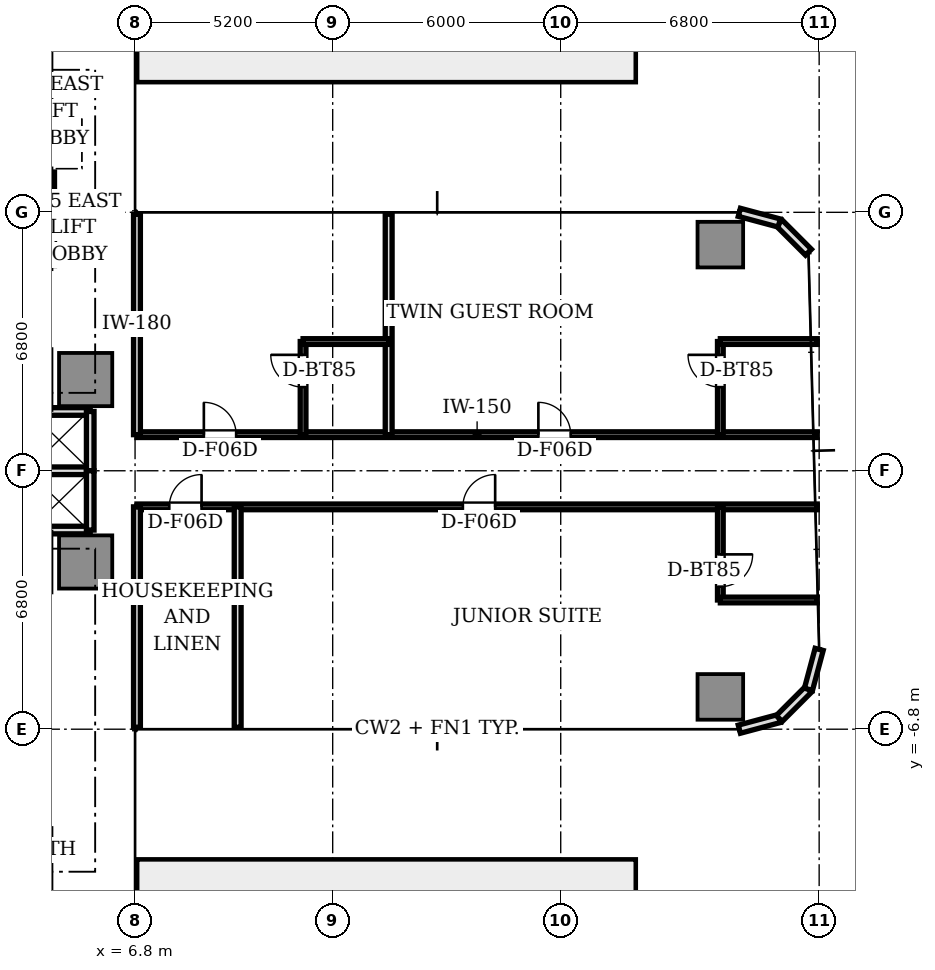
"""IFC4 building model, lengths in metres.
Left out: names, types, materials, properties, quantities, classifications, styles, units other than length and angle.
Written with IfcOpenShell. Run it as: python <this file> out.ifc"""

import sys

from ifc_helpers import new_model, si_unit, direction, frame, frame_2d, origin, origin_2d, place, context, subcontext, project, spatial, rectangle, extrude, source, transform, mapped, element, fill, save


model = new_model("IFC4")
c1 = context("Model", 3, precision=1e-05, world=origin(), true_north=direction((0.0, 1.0)))
c2 = subcontext(c1, "Body", "Model", "MODEL_VIEW")
j1 = project(units=[si_unit("LENGTHUNIT", "METRE"), si_unit("PLANEANGLEUNIT", "RADIAN")], contexts=[c1])
p1 = place(None, origin())
s1 = spatial("IfcSite", under=j1, at=p1, CompositionType="ELEMENT")
p2 = place(p1, origin())
s2 = spatial("IfcBuilding", under=s1, at=p2, CompositionType="ELEMENT")
p3 = place(p2, frame((0.0, 0.0, 23.1)))
s3 = spatial("IfcBuildingStorey", under=s2, at=p3, CompositionType="ELEMENT", Elevation=23.1)
m1 = source(origin(), c2, "Body", "SweptSolid", [
    extrude(rectangle(XDim=1.4, YDim=1.4, at=origin_2d()), origin(), (0.0, 0.0, 1.0), 3.11),
])
for number, where, z_axis, x_axis in (
    (1, (5.5, 2.4, 0.0), (0.0, 0.0, 1.0), (1.0, 0.0, 0.0)),
    (2, (5.5, -2.4, 0.0), (0.0, 0.0, 1.0), (1.0, 0.0, 0.0)),
):
    element("IfcColumn", number, at=place(p3, frame(where, z_axis=z_axis, x_axis=x_axis)), inside=s3, PredefinedType="COLUMN", context=c2, shape_type="MappedRepresentation", body=[
        mapped(m1, transform((0.0, 0.0, 0.0), scale=1.0)),
    ])
m2 = source(origin(), c2, "Body", "SweptSolid", [
    extrude(rectangle(XDim=1.2, YDim=1.2, at=origin_2d()), origin(), (0.0, 0.0, 1.0), 3.11),
])
for number, where, z_axis, x_axis in (
    (3, (22.2, -5.95, 0.0), (0.0, 0.0, 1.0), (1.0, 0.0, 0.0)),
    (4, (22.2, 5.95, 0.0), (0.0, 0.0, 1.0), (1.0, 0.0, 0.0)),
):
    element("IfcColumn", number, at=place(p3, frame(where, z_axis=z_axis, x_axis=x_axis)), inside=s3, PredefinedType="COLUMN", context=c2, shape_type="MappedRepresentation", body=[
        mapped(m2, transform((0.0, 0.0, 0.0), scale=1.0)),
    ])
for number, where, z_axis, x_axis in (
    (5, (22.7, -6.8, 0.0), (0.0, 0.0, 1.0), (0.966, 0.259, 0.0)),
    (6, (23.75, -6.519, 0.0), (0.0, 0.0, 1.0), (0.707, 0.707, 0.0)),
    (7, (24.519, -5.75, 0.0), (0.0, 0.0, 1.0), (0.259, 0.966, 0.0)),
    (8, (24.519, 5.75, 0.0), (0.0, 0.0, 1.0), (-0.707, 0.707, 0.0)),
    (9, (23.75, 6.519, 0.0), (0.0, 0.0, 1.0), (-0.966, 0.259, 0.0)),
):
    element("IfcWall", number, at=place(p3, frame(where, z_axis=z_axis, x_axis=x_axis)), inside=s3, PredefinedType="STANDARD", context=c2, shape_type="SweptSolid", body=[
        extrude(rectangle(XDim=1.087, YDim=0.22, at=frame_2d((0.543, 0.0))), origin(), (0.0, 0.0, 1.0), 3.11),
    ])
for number, where, z_axis, x_axis in (
    (10, (3.98, 1.56, 0.0), (0.0, 0.0, 1.0), (1.0, 0.0, 0.0)),
    (11, (3.98, -1.56, 0.0), (0.0, 0.0, 1.0), (1.0, 0.0, 0.0)),
    (12, (3.98, 0.0, 0.0), (0.0, 0.0, 1.0), (1.0, 0.0, 0.0)),
):
    element("IfcWall", number, at=place(p3, frame(where, z_axis=z_axis, x_axis=x_axis)), inside=s3, PredefinedType="SOLIDWALL", context=c2, shape_type="SweptSolid", body=[
        extrude(rectangle(XDim=1.64, YDim=0.2, at=frame_2d((0.82, 0.0))), origin(), (0.0, 0.0, 1.0), 2.66),
    ])
for number, where, z_axis, x_axis in (
    (13, (5.62, 0.0, 0.0), (0.0, 0.0, 1.0), (0.0, 1.0, 0.0)),
    (14, (5.62, -1.56, 0.0), (0.0, 0.0, 1.0), (0.0, 1.0, 0.0)),
):
    element("IfcWall", number, at=place(p3, frame(where, z_axis=z_axis, x_axis=x_axis)), inside=s3, PredefinedType="SOLIDWALL", context=c2, shape_type="SweptSolid", body=[
        extrude(rectangle(XDim=1.56, YDim=0.2, at=frame_2d((0.78, 0.0))), origin(), (0.0, 0.0, 1.0), 2.66),
    ])
p4 = place(p3, frame((4.58, 5.4, 0.0), z_axis=(0.0, 0.0, 1.0), x_axis=(0.0, 1.0, 0.0)))
e15 = element("IfcWall", 15, at=p4, inside=s3, PredefinedType="SOLIDWALL", context=c2, shape_type="SweptSolid", body=[
    extrude(rectangle(XDim=2.46, YDim=0.2, at=frame_2d((1.23, 0.0))), origin(), (0.0, 0.0, 1.0), 2.66),
])
p5 = place(p4, frame((0.55, 0.0, 0.0)))
e16 = element("IfcOpeningElement", 16, at=p5, cuts=e15, PredefinedType="OPENING", context=c2, shape_type="SweptSolid", body=[
    extrude(rectangle(XDim=0.85, YDim=2.1, at=frame_2d((0.425, 1.05))), frame((0.0, 0.11, 0.0), z_axis=(0.0, -1.0, 0.0), x_axis=(1.0, 0.0, 0.0)), (0.0, 0.0, 1.0), 0.22),
])
p6 = place(p3, frame((6.85, 0.95, 0.0), z_axis=(0.0, 0.0, 1.0), x_axis=(1.0, 0.0, 0.0)))
e17 = element("IfcWall", 17, at=p6, inside=s3, PredefinedType="PARTITIONING", context=c2, shape_type="SweptSolid", body=[
    extrude(rectangle(XDim=17.9, YDim=0.15, at=frame_2d((8.95, 0.0))), origin(), (0.0, 0.0, 1.0), 2.66),
])
p7 = place(p6, frame((1.76, 0.0, 0.0)))
e18 = element("IfcOpeningElement", 18, at=p7, cuts=e17, PredefinedType="OPENING", context=c2, shape_type="SweptSolid", body=[
    extrude(rectangle(XDim=0.85, YDim=2.1, at=frame_2d((0.425, 1.05))), frame((0.0, 0.085, 0.0), z_axis=(0.0, -1.0, 0.0), x_axis=(1.0, 0.0, 0.0)), (0.0, 0.0, 1.0), 0.17),
])
p8 = place(p6, frame((10.562, 0.0, 0.0)))
e19 = element("IfcOpeningElement", 19, at=p8, cuts=e17, PredefinedType="OPENING", context=c2, shape_type="SweptSolid", body=[
    extrude(rectangle(XDim=0.85, YDim=2.1, at=frame_2d((0.425, 1.05))), frame((0.0, 0.085, 0.0), z_axis=(0.0, -1.0, 0.0), x_axis=(1.0, 0.0, 0.0)), (0.0, 0.0, 1.0), 0.17),
])
p9 = place(p3, frame((6.85, -0.95, 0.0), z_axis=(0.0, 0.0, 1.0), x_axis=(1.0, 0.0, 0.0)))
e20 = element("IfcWall", 20, at=p9, inside=s3, PredefinedType="PARTITIONING", context=c2, shape_type="SweptSolid", body=[
    extrude(rectangle(XDim=17.9, YDim=0.15, at=frame_2d((8.95, 0.0))), origin(), (0.0, 0.0, 1.0), 2.66),
])
p10 = place(p9, frame((0.85, 0.0, 0.0)))
e21 = element("IfcOpeningElement", 21, at=p10, cuts=e20, PredefinedType="OPENING", context=c2, shape_type="SweptSolid", body=[
    extrude(rectangle(XDim=0.85, YDim=2.1, at=frame_2d((0.425, 1.05))), frame((0.0, 0.085, 0.0), z_axis=(0.0, -1.0, 0.0), x_axis=(1.0, 0.0, 0.0)), (0.0, 0.0, 1.0), 0.17),
])
p11 = place(p9, frame((8.575, 0.0, 0.0)))
e22 = element("IfcOpeningElement", 22, at=p11, cuts=e20, PredefinedType="OPENING", context=c2, shape_type="SweptSolid", body=[
    extrude(rectangle(XDim=0.85, YDim=2.1, at=frame_2d((0.425, 1.05))), frame((0.0, 0.085, 0.0), z_axis=(0.0, -1.0, 0.0), x_axis=(1.0, 0.0, 0.0)), (0.0, 0.0, 1.0), 0.17),
])
for number, where, z_axis, x_axis in (
    (23, (6.85, 0.95, 0.0), (0.0, 0.0, 1.0), (0.0, 1.0, 0.0)),
    (24, (6.85, -6.75, 0.0), (0.0, 0.0, 1.0), (0.0, 1.0, 0.0)),
    (25, (13.473, 0.95, 0.0), (0.0, 0.0, 1.0), (0.0, 1.0, 0.0)),
):
    element("IfcWall", number, at=place(p3, frame(where, z_axis=z_axis, x_axis=x_axis)), inside=s3, PredefinedType="PARTITIONING", context=c2, shape_type="SweptSolid", body=[
        extrude(rectangle(XDim=5.8, YDim=0.18, at=frame_2d((2.9, 0.0))), origin(), (0.0, 0.0, 1.0), 2.66),
    ])
p12 = place(p3, frame((11.221, 0.95, 0.0), z_axis=(0.0, 0.0, 1.0), x_axis=(0.0, 1.0, 0.0)))
e26 = element("IfcWall", 26, at=p12, inside=s3, PredefinedType="PARTITIONING", context=c2, shape_type="SweptSolid", body=[
    extrude(rectangle(XDim=2.45, YDim=0.15, at=frame_2d((1.225, 0.0))), origin(), (0.0, 0.0, 1.0), 2.66),
])
p13 = place(p12, frame((1.25, 0.0, 0.0)))
e27 = element("IfcOpeningElement", 27, at=p13, cuts=e26, PredefinedType="OPENING", context=c2, shape_type="SweptSolid", body=[
    extrude(rectangle(XDim=0.85, YDim=2.1, at=frame_2d((0.425, 1.05))), frame((0.0, 0.085, 0.0), z_axis=(0.0, -1.0, 0.0), x_axis=(1.0, 0.0, 0.0)), (0.0, 0.0, 1.0), 0.17),
])
p14 = place(p3, frame((11.221, 3.4, 0.0), z_axis=(0.0, 0.0, 1.0), x_axis=(1.0, 0.0, 0.0)))
e28 = element("IfcWall", 28, at=p14, inside=s3, PredefinedType="PARTITIONING", context=c2, shape_type="SweptSolid", body=[
    extrude(rectangle(XDim=2.252, YDim=0.15, at=frame_2d((1.126, 0.0))), origin(), (0.0, 0.0, 1.0), 2.63),
])
p15 = place(p3, frame((22.2, 0.95, 0.0), z_axis=(0.0, 0.0, 1.0), x_axis=(0.0, 1.0, 0.0)))
e29 = element("IfcWall", 29, at=p15, inside=s3, PredefinedType="PARTITIONING", context=c2, shape_type="SweptSolid", body=[
    extrude(rectangle(XDim=2.45, YDim=0.15, at=frame_2d((1.225, 0.0))), origin(), (0.0, 0.0, 1.0), 2.58),
])
p16 = place(p15, frame((1.25, 0.0, 0.0)))
e30 = element("IfcOpeningElement", 30, at=p16, cuts=e29, PredefinedType="OPENING", context=c2, shape_type="SweptSolid", body=[
    extrude(rectangle(XDim=0.85, YDim=2.1, at=frame_2d((0.425, 1.05))), frame((0.0, 0.085, 0.0), z_axis=(0.0, -1.0, 0.0), x_axis=(1.0, 0.0, 0.0)), (0.0, 0.0, 1.0), 0.17),
])
p17 = place(p3, frame((22.2, 3.4, 0.0), z_axis=(0.0, 0.0, 1.0), x_axis=(1.0, 0.0, 0.0)))
e31 = element("IfcWall", 31, at=p17, inside=s3, PredefinedType="PARTITIONING", context=c2, shape_type="SweptSolid", body=[
    extrude(rectangle(XDim=2.55, YDim=0.15, at=frame_2d((1.275, 0.0))), origin(), (0.0, 0.0, 1.0), 2.66),
])
p18 = place(p3, frame((9.5, -0.95, 0.0), z_axis=(0.0, 0.0, 1.0), x_axis=(0.0, -1.0, 0.0)))
e32 = element("IfcWall", 32, at=p18, inside=s3, PredefinedType="PARTITIONING", context=c2, shape_type="SweptSolid", body=[
    extrude(rectangle(XDim=5.8, YDim=0.18, at=frame_2d((2.9, 0.0))), origin(), (0.0, 0.0, 1.0), 2.66),
])
p19 = place(p3, frame((22.2, -0.95, 0.0), z_axis=(0.0, 0.0, 1.0), x_axis=(0.0, -1.0, 0.0)))
e33 = element("IfcWall", 33, at=p19, inside=s3, PredefinedType="PARTITIONING", context=c2, shape_type="SweptSolid", body=[
    extrude(rectangle(XDim=2.45, YDim=0.15, at=frame_2d((1.225, 0.0))), origin(), (0.0, 0.0, 1.0), 2.58),
])
p20 = place(p19, frame((1.25, 0.0, 0.0)))
e34 = element("IfcOpeningElement", 34, at=p20, cuts=e33, PredefinedType="OPENING", context=c2, shape_type="SweptSolid", body=[
    extrude(rectangle(XDim=0.85, YDim=2.1, at=frame_2d((0.425, 1.05))), frame((0.0, 0.085, 0.0), z_axis=(0.0, -1.0, 0.0), x_axis=(1.0, 0.0, 0.0)), (0.0, 0.0, 1.0), 0.17),
])
p21 = place(p3, frame((22.2, -3.4, 0.0), z_axis=(0.0, 0.0, 1.0), x_axis=(1.0, 0.0, 0.0)))
e35 = element("IfcWall", 35, at=p21, inside=s3, PredefinedType="PARTITIONING", context=c2, shape_type="SweptSolid", body=[
    extrude(rectangle(XDim=2.55, YDim=0.15, at=frame_2d((1.275, 0.0))), origin(), (0.0, 0.0, 1.0), 2.66),
])
m3 = source(origin(), c2, "Body", "SweptSolid", [
    extrude(rectangle(XDim=0.85, YDim=0.05, at=origin_2d()), origin(), (0.0, 0.0, 1.0), 2.1),
])
p22 = place(p13, frame((0.425, 0.0, 0.0)))
e36 = element("IfcDoor", 36, at=p22, inside=s3, OperationType="SINGLE_SWING_RIGHT", PredefinedType="DOOR", context=c2, shape_type="MappedRepresentation", body=[
    mapped(m3, transform((0.0, 0.0, 0.0), scale=1.0)),
])
fill(e27, e36)
p23 = place(p7, frame((0.425, 0.0, 0.0)))
e37 = element("IfcDoor", 37, at=p23, inside=s3, OperationType="SINGLE_SWING_LEFT", PredefinedType="DOOR", context=c2, shape_type="MappedRepresentation", body=[
    mapped(m3, transform((0.0, 0.0, 0.0), scale=1.0)),
])
fill(e18, e37)
p24 = place(p16, frame((0.425, 0.0, 0.0)))
e38 = element("IfcDoor", 38, at=p24, inside=s3, OperationType="SINGLE_SWING_RIGHT", PredefinedType="DOOR", context=c2, shape_type="MappedRepresentation", body=[
    mapped(m3, transform((0.0, 0.0, 0.0), scale=1.0)),
])
fill(e30, e38)
p25 = place(p8, frame((0.425, 0.0, 0.0)))
e39 = element("IfcDoor", 39, at=p25, inside=s3, OperationType="SINGLE_SWING_LEFT", PredefinedType="DOOR", context=c2, shape_type="MappedRepresentation", body=[
    mapped(m3, transform((0.0, 0.0, 0.0), scale=1.0)),
])
fill(e19, e39)
p26 = place(p10, frame((0.425, 0.0, 0.0)))
e40 = element("IfcDoor", 40, at=p26, inside=s3, OperationType="SINGLE_SWING_RIGHT", PredefinedType="DOOR", context=c2, shape_type="MappedRepresentation", body=[
    mapped(m3, transform((0.0, 0.0, 0.0), scale=1.0)),
])
fill(e21, e40)
p27 = place(p20, frame((0.425, 0.0, 0.0)))
e41 = element("IfcDoor", 41, at=p27, inside=s3, OperationType="SINGLE_SWING_LEFT", PredefinedType="DOOR", context=c2, shape_type="MappedRepresentation", body=[
    mapped(m3, transform((0.0, 0.0, 0.0), scale=1.0)),
])
fill(e34, e41)
p28 = place(p11, frame((0.425, 0.0, 0.0)))
e42 = element("IfcDoor", 42, at=p28, inside=s3, OperationType="SINGLE_SWING_RIGHT", PredefinedType="DOOR", context=c2, shape_type="MappedRepresentation", body=[
    mapped(m3, transform((0.0, 0.0, 0.0), scale=1.0)),
])
fill(e22, e42)
save(model, sys.argv[1])
